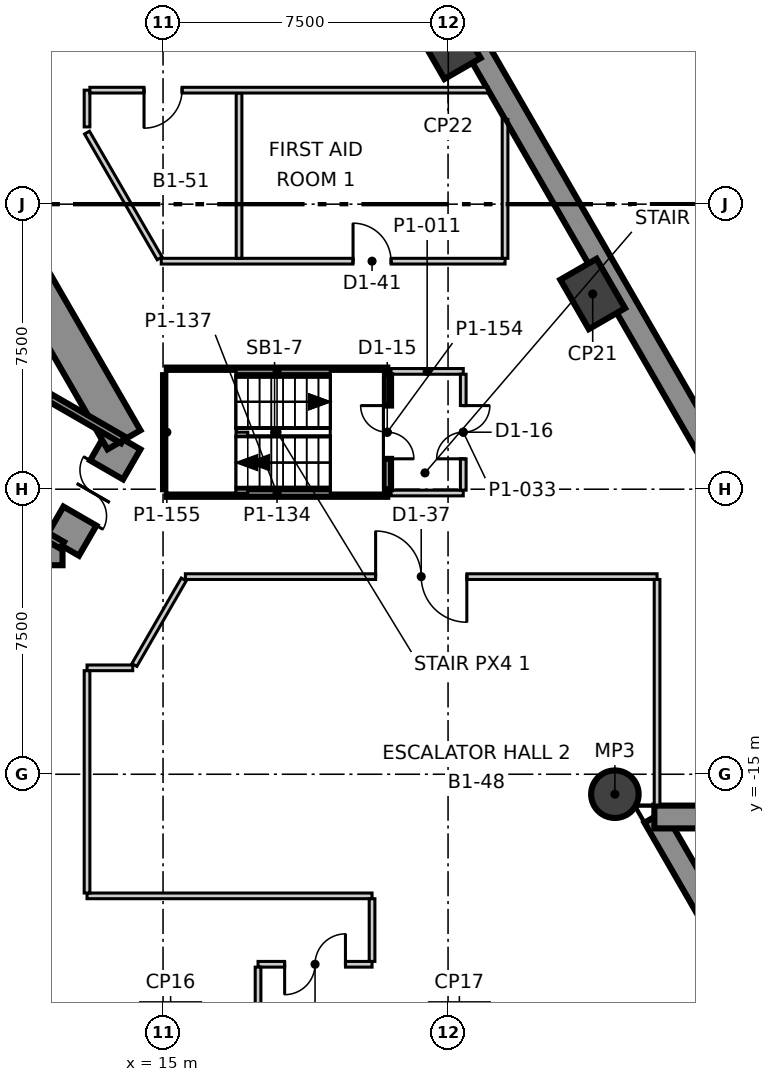
"""IFC4 building model, lengths in metres.
Left out: names, types, materials, properties, quantities, classifications, styles, units other than length and angle.
Written with IfcOpenShell. Run it as: python <this file> out.ifc"""

import sys

from ifc_helpers import new_model, si_unit, direction, frame, frame_2d, origin, origin_2d, place, context, subcontext, project, spatial, polyline, rectangle, circle, outline, extrude, element, fill, save


model = new_model("IFC4")
c1 = context("Model", 3, precision=1e-05, world=origin(), true_north=direction((0.0, 1.0)))
c2 = subcontext(c1, "Body", "Model", "MODEL_VIEW")
j1 = project(units=[si_unit("LENGTHUNIT", "METRE"), si_unit("PLANEANGLEUNIT", "RADIAN")], contexts=[c1])
p1 = place(None, origin())
s1 = spatial("IfcSite", under=j1, at=p1, CompositionType="ELEMENT")
p2 = place(p1, origin())
s2 = spatial("IfcBuilding", under=s1, at=p2, CompositionType="ELEMENT")
p3 = place(p2, frame((0.0, 0.0, -5.5)))
s3 = spatial("IfcBuildingStorey", under=s2, at=p3, CompositionType="ELEMENT", Elevation=-5.5)
p4 = place(p3, frame((31.783, -22.8, -0.4), z_axis=(0.0, 0.0, 1.0), x_axis=(-0.500015828289, 0.866016265125, 0.0)))
e1 = element("IfcWall", 1, at=p4, inside=s3, PredefinedType="SOLIDWALL", context=c2, shape_type="SweptSolid", body=[
    extrude(rectangle(XDim=7.708, YDim=0.6, at=frame_2d((3.854, 0.0))), origin(), (0.0, 0.0, 1.0), 5.5),
])
p5 = place(p3, frame((27.929, -16.125, -0.4), z_axis=(0.0, 0.0, 1.0), x_axis=(1.0, 0.0, 0.0)))
e2 = element("IfcWall", 2, at=p5, inside=s3, PredefinedType="SOLIDWALL", context=c2, shape_type="SweptSolid", body=[
    extrude(rectangle(XDim=7.015, YDim=0.6, at=frame_2d((3.508, 0.0))), origin(), (0.0, 0.0, 1.0), 5.5),
])
p6 = place(p3, frame((34.944, -16.125, -0.4), z_axis=(0.0, 0.0, 1.0), x_axis=(-0.500003790369, 0.866023215403, 0.0)))
e3 = element("IfcWall", 3, at=p6, inside=s3, PredefinedType="SOLIDWALL", context=c2, shape_type="SweptSolid", body=[
    extrude(rectangle(XDim=62.874, YDim=0.6, at=frame_2d((31.437, 0.0))), origin(), (0.0, 0.0, 1.0), 5.5),
])
p7 = place(p3, frame((-12.355, -9.0, -0.4), z_axis=(0.0, 0.0, 1.0), x_axis=(1.0, 0.0, 0.0)))
e4 = element("IfcWall", 4, at=p7, inside=s3, PredefinedType="SHEAR", context=c2, shape_type="SweptSolid", body=[
    extrude(outline(polyline([(-0.289, -0.5), (1.656, -0.5), (3.601, -0.5), (5.547, -0.5), (7.492, -0.5), (9.437, -0.5), (11.382, -0.5), (13.328, -0.5), (15.273, -0.5), (17.218, -0.5), (19.163, -0.5), (21.109, -0.5), (23.054, -0.5), (24.999, -0.5), (24.422, 0.5), (22.566, 0.5), (20.709, 0.5), (18.853, 0.5), (16.996, 0.5), (15.14, 0.5), (13.283, 0.5), (11.427, 0.5), (9.57, 0.5), (7.714, 0.5), (5.857, 0.5), (4.001, 0.5), (2.145, 0.5), (0.288, 0.5), (-0.289, -0.5)])), origin(), (0.0, 0.0, 1.0), 5.5),
])
p8 = place(p7, frame((11.455, 0.0, 0.4)))
e5 = element("IfcOpeningElement", 5, at=p8, cuts=e4, PredefinedType="OPENING", context=c2, shape_type="SweptSolid", body=[
    extrude(rectangle(XDim=1.8, YDim=2.1, at=frame_2d((0.9, 1.05))), frame((0.0, 0.51, 0.0), z_axis=(0.0, -1.0, 0.0), x_axis=(1.0, 0.0, 0.0)), (0.0, 0.0, 1.0), 1.02),
])
p9 = place(p3, frame((12.355, -9.0, -0.4), z_axis=(0.0, 0.0, 1.0), x_axis=(0.500077567175, 0.865980615723, 0.0)))
e6 = element("IfcWall", 6, at=p9, inside=s3, PredefinedType="SHEAR", context=c2, shape_type="SweptSolid", body=[
    extrude(outline(polyline([(-0.288, -0.5), (1.617, -0.5), (3.522, -0.5), (2.945, 0.5), (1.617, 0.5), (0.289, 0.499), (-0.288, -0.5)])), origin(), (0.0, 0.0, 1.0), 5.5),
])
p10 = place(p9, frame((0.917, 0.0, 0.4)))
e7 = element("IfcOpeningElement", 7, at=p10, cuts=e6, PredefinedType="OPENING", context=c2, shape_type="SweptSolid", body=[
    extrude(rectangle(XDim=1.4, YDim=2.1, at=frame_2d((0.7, 1.05))), frame((0.0, 0.51, 0.0), z_axis=(0.0, -1.0, 0.0), x_axis=(1.0, 0.0, 0.0)), (0.0, 0.0, 1.0), 1.02),
])
p11 = place(p3, frame((13.972, -6.2, -0.4), z_axis=(0.0, 0.0, 1.0), x_axis=(-0.499992141631, 0.866029940768, 0.0)))
e8 = element("IfcWall", 8, at=p11, inside=s3, PredefinedType="SHEAR", context=c2, shape_type="SweptSolid", body=[
    extrude(outline(polyline([(-0.288, -0.5), (1.657, -0.5), (3.602, -0.5), (5.547, -0.5), (7.493, -0.5), (9.438, -0.5), (11.383, -0.5), (13.328, -0.5), (15.273, -0.5), (17.218, -0.499), (19.164, -0.499), (21.109, -0.499), (23.054, -0.499), (24.999, -0.499), (24.422, 0.5), (22.566, 0.5), (20.709, 0.5), (18.853, 0.5), (16.996, 0.5), (15.14, 0.5), (13.283, 0.5), (11.427, 0.5), (9.57, 0.5), (7.714, 0.5), (5.857, 0.5), (4.001, 0.5), (2.145, 0.5), (0.288, 0.5), (-0.288, -0.5)])), origin(), (0.0, 0.0, 1.0), 5.5),
])
for number, where, z_axis, x_axis in (
    (9, (26.306, -2.363, -0.4), (0.0, 0.0, 1.0), (-0.5, 0.866, 0.0)),
    (10, (22.506, 4.219, -0.4), (0.0, 0.0, 1.0), (-0.5, 0.866, 0.0)),
):
    element("IfcColumn", number, at=place(p3, frame(where, z_axis=z_axis, x_axis=x_axis)), inside=s3, PredefinedType="COLUMN", context=c2, shape_type="SweptSolid", body=[
        extrude(rectangle(XDim=1.5, YDim=1.1, at=origin_2d()), origin(), (0.0, 0.0, 1.0), 5.5),
    ])
p12 = place(p3, frame((26.89, -15.525, -0.4), z_axis=(0.0, 0.0, 1.0), x_axis=(1.0, 0.0, 0.0)))
e11 = element("IfcColumn", 11, at=p12, inside=s3, PredefinedType="COLUMN", context=c2, shape_type="SweptSolid", body=[
    extrude(circle(Radius=0.625, at=origin_2d()), origin(), (0.0, 0.0, 1.0), 5.5),
])
for number, where, z_axis, x_axis in (
    (12, (21.0, -7.6, 0.0), (0.0, 0.0, 1.0), (1.0, 0.0, 0.0)),
    (13, (21.0, -4.4, 0.0), (0.0, 0.0, 1.0), (1.0, 0.0, 0.0)),
):
    element("IfcWall", number, at=place(p3, frame(where, z_axis=z_axis, x_axis=x_axis)), inside=s3, PredefinedType="PARTITIONING", context=c2, shape_type="SweptSolid", body=[
        extrude(rectangle(XDim=1.9, YDim=0.15, at=frame_2d((0.95, 0.0))), origin(), (0.0, 0.0, 1.0), 5.1),
    ])
p13 = place(p3, frame((22.9, -7.525, 0.0), z_axis=(0.0, 0.0, 1.0), x_axis=(0.0, 1.0, 0.0)))
e14 = element("IfcWall", 14, at=p13, inside=s3, PredefinedType="PARTITIONING", context=c2, shape_type="SweptSolid", body=[
    extrude(rectangle(XDim=3.05, YDim=0.15, at=frame_2d((1.525, 0.0))), origin(), (0.0, 0.0, 1.0), 5.1),
])
p14 = place(p13, frame((0.825, 0.0, 0.0)))
e15 = element("IfcOpeningElement", 15, at=p14, cuts=e14, PredefinedType="OPENING", context=c2, shape_type="SweptSolid", body=[
    extrude(rectangle(XDim=1.4, YDim=2.1, at=frame_2d((0.7, 1.05))), frame((0.0, 0.085, 0.0), z_axis=(0.0, -1.0, 0.0), x_axis=(1.0, 0.0, 0.0)), (0.0, 0.0, 1.0), 0.17),
])
p15 = place(p3, frame((17.5, -20.0, 0.0), z_axis=(0.0, 0.0, 1.0), x_axis=(1.0, 0.0, 0.0)))
e16 = element("IfcWall", 16, at=p15, inside=s3, PredefinedType="PARTITIONING", context=c2, shape_type="SweptSolid", body=[
    extrude(rectangle(XDim=3.0, YDim=0.15, at=frame_2d((1.5, 0.0))), origin(), (0.0, 0.0, 1.0), 5.1),
])
p16 = place(p15, frame((0.7, 0.0, 0.0)))
e17 = element("IfcOpeningElement", 17, at=p16, cuts=e16, PredefinedType="OPENING", context=c2, shape_type="SweptSolid", body=[
    extrude(rectangle(XDim=1.6, YDim=2.1, at=frame_2d((0.8, 1.05))), frame((0.0, 0.085, 0.0), z_axis=(0.0, -1.0, 0.0), x_axis=(1.0, 0.0, 0.0)), (0.0, 0.0, 1.0), 0.17),
])
p17 = place(p3, frame((17.5, -22.427, 0.0), z_axis=(0.0, 0.0, 1.0), x_axis=(0.0, 1.0, 0.0)))
e18 = element("IfcWall", 18, at=p17, inside=s3, PredefinedType="PARTITIONING", context=c2, shape_type="SweptSolid", body=[
    extrude(rectangle(XDim=2.352, YDim=0.15, at=frame_2d((1.176, 0.0))), origin(), (0.0, 0.0, 1.0), 5.1),
])
p18 = place(p3, frame((15.588, -9.8, 0.0), z_axis=(0.0, 0.0, 1.0), x_axis=(1.0, 0.0, 0.0)))
e19 = element("IfcWall", 19, at=p18, inside=s3, PredefinedType="PARTITIONING", context=c2, shape_type="SweptSolid", body=[
    extrude(rectangle(XDim=12.412, YDim=0.15, at=frame_2d((6.206, 0.0))), origin(), (0.0, 0.0, 1.0), 5.1),
])
p19 = place(p18, frame((5.006, 0.0, 0.0)))
e20 = element("IfcOpeningElement", 20, at=p19, cuts=e19, PredefinedType="OPENING", context=c2, shape_type="SweptSolid", body=[
    extrude(rectangle(XDim=2.4, YDim=2.1, at=frame_2d((1.2, 1.05))), frame((0.0, 0.085, 0.0), z_axis=(0.0, -1.0, 0.0), x_axis=(1.0, 0.0, 0.0)), (0.0, 0.0, 1.0), 0.17),
])
p20 = place(p3, frame((13.0, -12.2, 0.0), z_axis=(0.0, 0.0, 1.0), x_axis=(1.0, 0.0, 0.0)))
e21 = element("IfcWall", 21, at=p20, inside=s3, PredefinedType="PARTITIONING", context=c2, shape_type="SweptSolid", body=[
    extrude(rectangle(XDim=1.203, YDim=0.15, at=frame_2d((0.602, 0.0))), origin(), (0.0, 0.0, 1.0), 5.1),
])
p21 = place(p3, frame((13.0, -18.2, 0.0), z_axis=(0.0, 0.0, 1.0), x_axis=(1.0, 0.0, 0.0)))
e22 = element("IfcWall", 22, at=p21, inside=s3, PredefinedType="PARTITIONING", context=c2, shape_type="SweptSolid", body=[
    extrude(rectangle(XDim=7.5, YDim=0.15, at=frame_2d((3.75, 0.0))), origin(), (0.0, 0.0, 1.0), 5.1),
])
p22 = place(p3, frame((14.953, -1.5, 0.0), z_axis=(0.0, 0.0, 1.0), x_axis=(1.0, 0.0, 0.0)))
e23 = element("IfcWall", 23, at=p22, inside=s3, PredefinedType="PARTITIONING", context=c2, shape_type="SweptSolid", body=[
    extrude(rectangle(XDim=9.047, YDim=0.15, at=frame_2d((4.523, 0.0))), origin(), (0.0, 0.0, 1.0), 4.5),
])
p23 = place(p22, frame((5.047, 0.0, 0.0)))
e24 = element("IfcOpeningElement", 24, at=p23, cuts=e23, PredefinedType="OPENING", context=c2, shape_type="SweptSolid", body=[
    extrude(rectangle(XDim=1.0, YDim=2.1, at=frame_2d((0.5, 1.05))), frame((0.0, 0.085, 0.0), z_axis=(0.0, -1.0, 0.0), x_axis=(1.0, 0.0, 0.0)), (0.0, 0.0, 1.0), 0.17),
])
p24 = place(p3, frame((24.0, -1.425, 0.0), z_axis=(0.0, 0.0, 1.0), x_axis=(0.0, 1.0, 0.0)))
e25 = element("IfcWall", 25, at=p24, inside=s3, PredefinedType="PARTITIONING", context=c2, shape_type="SweptSolid", body=[
    extrude(rectangle(XDim=3.656, YDim=0.15, at=frame_2d((1.828, 0.0))), origin(), (0.0, 0.0, 1.0), 5.1),
])
p25 = place(p3, frame((17.0, -1.425, 0.0), z_axis=(0.0, 0.0, 1.0), x_axis=(0.0, 1.0, 0.0)))
e26 = element("IfcWall", 26, at=p25, inside=s3, PredefinedType="PARTITIONING", context=c2, shape_type="SweptSolid", body=[
    extrude(rectangle(XDim=4.35, YDim=0.15, at=frame_2d((2.175, 0.0))), origin(), (0.0, 0.0, 1.0), 5.1),
])
p26 = place(p3, frame((13.0, 1.883, 0.0), z_axis=(0.0, 0.0, 1.0), x_axis=(0.499995391149, -0.86602806469, 0.0)))
e27 = element("IfcWall", 27, at=p26, inside=s3, PredefinedType="PARTITIONING", context=c2, shape_type="SweptSolid", body=[
    extrude(rectangle(XDim=3.82, YDim=0.15, at=frame_2d((1.91, 0.0))), origin(), (0.0, 0.0, 1.0), 5.1),
])
p27 = place(p3, frame((13.0, -18.125, 0.0), z_axis=(0.0, 0.0, 1.0), x_axis=(0.0, 1.0, 0.0)))
e28 = element("IfcWall", 28, at=p27, inside=s3, PredefinedType="PARTITIONING", context=c2, shape_type="SweptSolid", body=[
    extrude(rectangle(XDim=5.85, YDim=0.15, at=frame_2d((2.925, 0.0))), origin(), (0.0, 0.0, 1.0), 5.1),
])
p28 = place(p3, frame((13.0, 2.033, 0.0), z_axis=(0.0, 0.0, 1.0), x_axis=(0.0, 1.0, 0.0)))
e29 = element("IfcWall", 29, at=p28, inside=s3, PredefinedType="PARTITIONING", context=c2, shape_type="SweptSolid", body=[
    extrude(rectangle(XDim=0.967, YDim=0.15, at=frame_2d((0.483, 0.0))), origin(), (0.0, 0.0, 1.0), 5.1),
])
p29 = place(p3, frame((13.075, 3.0, 0.0), z_axis=(0.0, 0.0, 1.0), x_axis=(1.0, 0.0, 0.0)))
e30 = element("IfcWall", 30, at=p29, inside=s3, PredefinedType="PARTITIONING", context=c2, shape_type="SweptSolid", body=[
    extrude(rectangle(XDim=10.481, YDim=0.15, at=frame_2d((5.24, 0.0))), origin(), (0.0, 0.0, 1.0), 4.55),
])
p30 = place(p29, frame((1.425, 0.0, 0.0)))
e31 = element("IfcOpeningElement", 31, at=p30, cuts=e30, PredefinedType="OPENING", context=c2, shape_type="SweptSolid", body=[
    extrude(rectangle(XDim=1.0, YDim=2.1, at=frame_2d((0.5, 1.05))), frame((0.0, 0.085, 0.0), z_axis=(0.0, -1.0, 0.0), x_axis=(1.0, 0.0, 0.0)), (0.0, 0.0, 1.0), 0.17),
])
p31 = place(p3, frame((20.5, -19.925, 0.0), z_axis=(0.0, 0.0, 1.0), x_axis=(0.0, 1.0, 0.0)))
e32 = element("IfcWall", 32, at=p31, inside=s3, PredefinedType="PARTITIONING", context=c2, shape_type="SweptSolid", body=[
    extrude(rectangle(XDim=1.65, YDim=0.15, at=frame_2d((0.825, 0.0))), origin(), (0.0, 0.0, 1.0), 5.1),
])
p32 = place(p3, frame((14.246, -12.125, 0.0), z_axis=(0.0, 0.0, 1.0), x_axis=(0.499939380126, 0.866060399857, 0.0)))
e33 = element("IfcWall", 33, at=p32, inside=s3, PredefinedType="PARTITIONING", context=c2, shape_type="SweptSolid", body=[
    extrude(rectangle(XDim=2.598, YDim=0.15, at=frame_2d((1.299, 0.0))), origin(), (0.0, 0.0, 1.0), 5.1),
])
p33 = place(p3, frame((28.0, -15.825, 0.0), z_axis=(0.0, 0.0, 1.0), x_axis=(0.0, 1.0, 0.0)))
e34 = element("IfcWall", 34, at=p33, inside=s3, PredefinedType="PARTITIONING", context=c2, shape_type="SweptSolid", body=[
    extrude(rectangle(XDim=5.95, YDim=0.15, at=frame_2d((2.975, 0.0))), origin(), (0.0, 0.0, 1.0), 5.1),
])
p34 = place(p3, frame((4.829, -4.636, 0.0), z_axis=(0.0, 0.0, 1.0), x_axis=(0.866013680014, -0.500020305616, 0.0)))
e35 = element("IfcWall", 35, at=p34, inside=s3, PredefinedType="SOLIDWALL", context=c2, shape_type="SweptSolid", body=[
    extrude(rectangle(XDim=8.68, YDim=0.2, at=frame_2d((4.34, 0.0))), origin(), (0.0, 0.0, 1.0), 5.1),
])
p35 = place(p3, frame((6.516, -1.914, 0.0), z_axis=(0.0, 0.0, 1.0), x_axis=(0.866006929508, -0.50003199702, 0.0)))
e36 = element("IfcWall", 36, at=p35, inside=s3, PredefinedType="SOLIDWALL", context=c2, shape_type="SweptSolid", body=[
    extrude(rectangle(XDim=8.58, YDim=0.2, at=frame_2d((4.29, 0.0))), origin(), (0.0, 0.0, 1.0), 5.1),
])
for number, where, z_axis, x_axis in (
    (37, (15.1, -4.4, 0.0), (0.0, 0.0, 1.0), (1.0, 0.0, 0.0)),
    (38, (15.1, -7.6, 0.0), (0.0, 0.0, 1.0), (1.0, 0.0, 0.0)),
):
    element("IfcWall", number, at=place(p3, frame(where, z_axis=z_axis, x_axis=x_axis)), inside=s3, PredefinedType="SOLIDWALL", context=c2, shape_type="SweptSolid", body=[
        extrude(rectangle(XDim=5.8, YDim=0.2, at=frame_2d((2.9, 0.0))), origin(), (0.0, 0.0, 1.0), 5.1),
    ])
p36 = place(p3, frame((20.9, -7.5, 0.0), z_axis=(0.0, 0.0, 1.0), x_axis=(0.0, 1.0, 0.0)))
e39 = element("IfcWall", 39, at=p36, inside=s3, PredefinedType="SOLIDWALL", context=c2, shape_type="SweptSolid", body=[
    extrude(rectangle(XDim=3.0, YDim=0.2, at=frame_2d((1.5, 0.0))), origin(), (0.0, 0.0, 1.0), 5.1),
])
p37 = place(p36, frame((0.8, 0.0, 0.0)))
e40 = element("IfcOpeningElement", 40, at=p37, cuts=e39, PredefinedType="OPENING", context=c2, shape_type="SweptSolid", body=[
    extrude(rectangle(XDim=1.4, YDim=2.1, at=frame_2d((0.7, 1.05))), frame((0.0, 0.11, 0.0), z_axis=(0.0, -1.0, 0.0), x_axis=(1.0, 0.0, 0.0)), (0.0, 0.0, 1.0), 0.22),
])
p38 = place(p3, frame((15.1, -7.5, 0.0), z_axis=(0.0, 0.0, 1.0), x_axis=(0.0, 1.0, 0.0)))
e41 = element("IfcWall", 41, at=p38, inside=s3, PredefinedType="SOLIDWALL", context=c2, shape_type="SweptSolid", body=[
    extrude(rectangle(XDim=3.0, YDim=0.2, at=frame_2d((1.5, 0.0))), origin(), (0.0, 0.0, 1.0), 5.1),
])
p39 = place(p16, origin())
e42 = element("IfcDoor", 42, at=p39, inside=s3, OperationType="DOUBLE_DOOR_SINGLE_SWING", PredefinedType="DOOR", context=c2, shape_type="SweptSolid", body=[
    extrude(rectangle(XDim=1.6, YDim=2.1, at=frame_2d((0.8, 1.05))), frame((0.0, 0.025, 0.0), z_axis=(0.0, -1.0, 0.0), x_axis=(1.0, 0.0, 0.0)), (0.0, 0.0, 1.0), 0.05),
])
fill(e17, e42)
p40 = place(p37, origin())
e43 = element("IfcDoor", 43, at=p40, inside=s3, OperationType="DOUBLE_DOOR_SINGLE_SWING", PredefinedType="DOOR", context=c2, shape_type="SweptSolid", body=[
    extrude(rectangle(XDim=1.4, YDim=2.1, at=frame_2d((0.7, 1.05))), frame((0.0, 0.025, 0.0), z_axis=(0.0, -1.0, 0.0), x_axis=(1.0, 0.0, 0.0)), (0.0, 0.0, 1.0), 0.05),
])
fill(e40, e43)
p41 = place(p14, origin())
e44 = element("IfcDoor", 44, at=p41, inside=s3, OperationType="DOUBLE_DOOR_SINGLE_SWING", PredefinedType="DOOR", context=c2, shape_type="SweptSolid", body=[
    extrude(rectangle(XDim=1.4, YDim=2.1, at=frame_2d((0.7, 1.05))), frame((0.0, 0.025, 0.0), z_axis=(0.0, -1.0, 0.0), x_axis=(1.0, 0.0, 0.0)), (0.0, 0.0, 1.0), 0.05),
])
fill(e15, e44)
p42 = place(p19, origin())
e45 = element("IfcDoor", 45, at=p42, inside=s3, OperationType="DOUBLE_DOOR_SINGLE_SWING", PredefinedType="DOOR", context=c2, shape_type="SweptSolid", body=[
    extrude(rectangle(XDim=2.4, YDim=2.1, at=frame_2d((1.2, 1.05))), frame((0.0, 0.025, 0.0), z_axis=(0.0, -1.0, 0.0), x_axis=(1.0, 0.0, 0.0)), (0.0, 0.0, 1.0), 0.05),
])
fill(e20, e45)
p43 = place(p30, origin())
e46 = element("IfcDoor", 46, at=p43, inside=s3, OperationType="SINGLE_SWING_LEFT", PredefinedType="DOOR", context=c2, shape_type="SweptSolid", body=[
    extrude(rectangle(XDim=1.0, YDim=2.1, at=frame_2d((0.5, 1.05))), frame((0.0, 0.025, 0.0), z_axis=(0.0, -1.0, 0.0), x_axis=(1.0, 0.0, 0.0)), (0.0, 0.0, 1.0), 0.05),
])
fill(e31, e46)
p44 = place(p23, origin())
e47 = element("IfcDoor", 47, at=p44, inside=s3, OperationType="SINGLE_SWING_RIGHT", PredefinedType="DOOR", context=c2, shape_type="SweptSolid", body=[
    extrude(rectangle(XDim=1.0, YDim=2.1, at=frame_2d((0.5, 1.05))), frame((0.0, 0.025, 0.0), z_axis=(0.0, -1.0, 0.0), x_axis=(1.0, 0.0, 0.0)), (0.0, 0.0, 1.0), 0.05),
])
fill(e24, e47)
p45 = place(p10, origin())
e48 = element("IfcDoor", 48, at=p45, inside=s3, OperationType="DOUBLE_DOOR_SINGLE_SWING", PredefinedType="DOOR", context=c2, shape_type="SweptSolid", body=[
    extrude(rectangle(XDim=1.4, YDim=2.1, at=frame_2d((0.7, 1.05))), frame((0.0, 0.025, 0.0), z_axis=(0.0, -1.0, 0.0), x_axis=(1.0, 0.0, 0.0)), (0.0, 0.0, 1.0), 0.05),
])
fill(e7, e48)
save(model, sys.argv[1])
